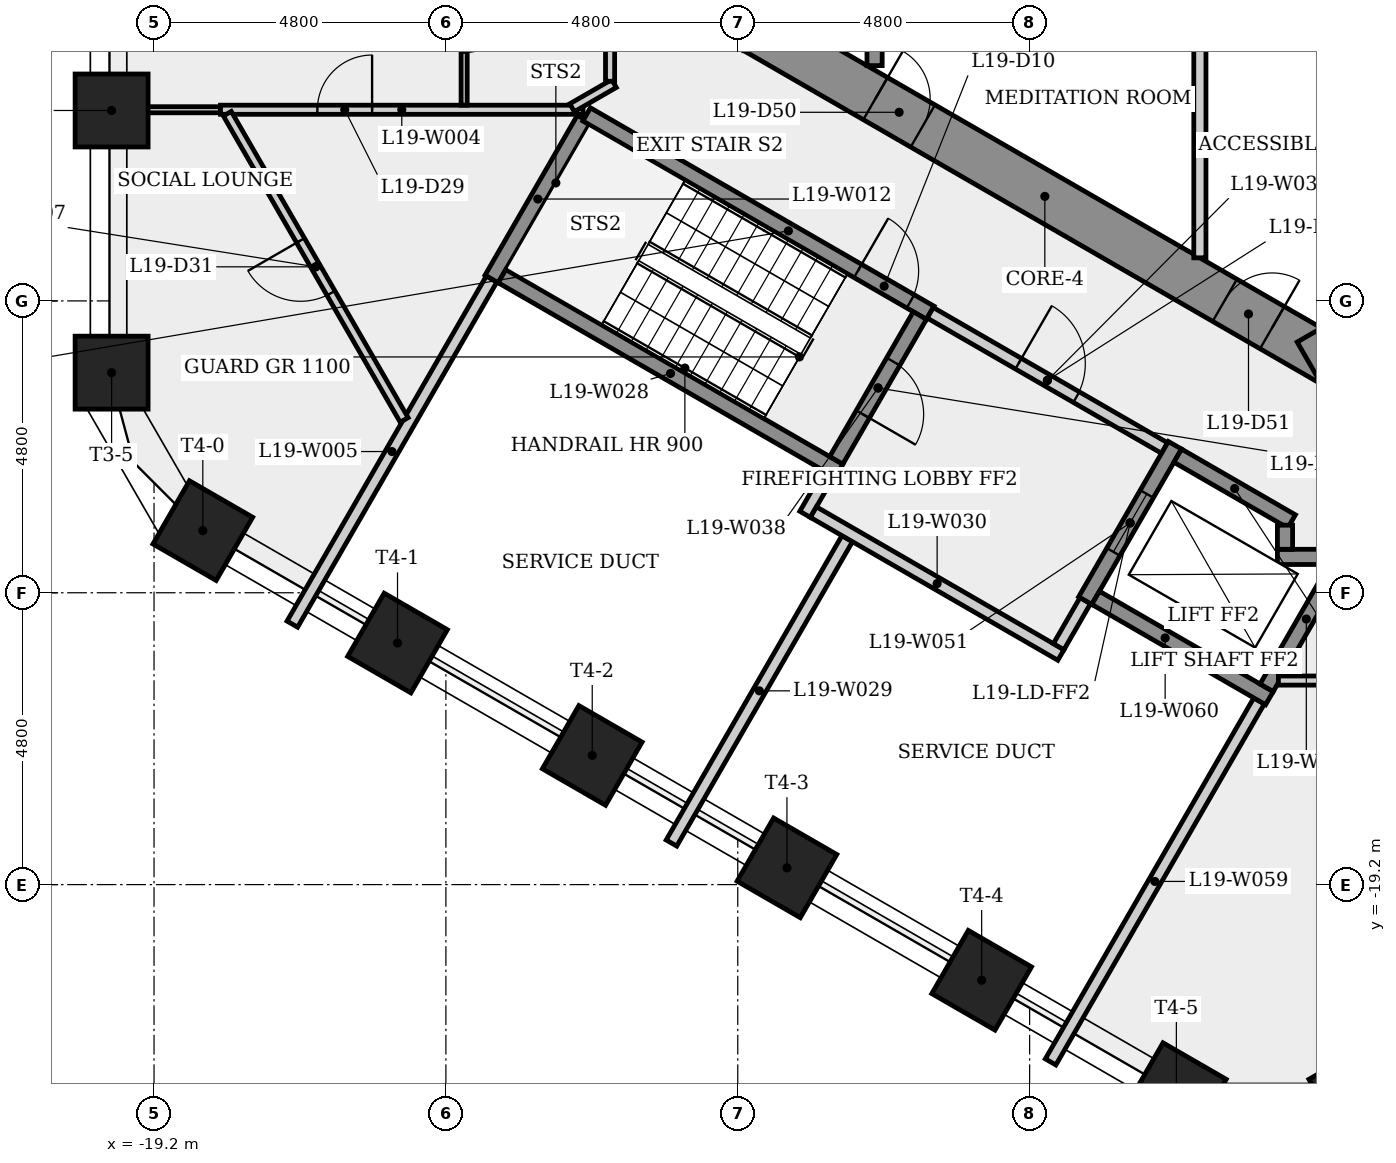
"""IFC4 building model, lengths in metres.
Left out: names, types, materials, properties, quantities, classifications, styles, units other than length and angle.
Written with IfcOpenShell. Run it as: python <this file> out.ifc"""

import sys

from ifc_helpers import new_model, si_unit, direction, frame, frame_2d, origin, origin_2d, place, context, subcontext, project, spatial, rectangle, extrude, element, fill, save


model = new_model("IFC4")
c1 = context("Model", 3, precision=1e-05, world=origin(), true_north=direction((0.0, 1.0)))
c2 = subcontext(c1, "Body", "Model", "MODEL_VIEW")
j1 = project(units=[si_unit("LENGTHUNIT", "METRE"), si_unit("PLANEANGLEUNIT", "RADIAN")], contexts=[c1])
p1 = place(None, origin())
s1 = spatial("IfcSite", under=j1, at=p1, CompositionType="ELEMENT")
p2 = place(p1, origin())
s2 = spatial("IfcBuilding", under=s1, at=p2, CompositionType="ELEMENT")
p3 = place(p2, frame((0.0, 0.0, 74.3)))
s3 = spatial("IfcBuildingStorey", under=s2, at=p3, CompositionType="ELEMENT", Elevation=74.3)
p4 = place(p3, frame((-9.3, -5.138, 0.0), z_axis=(0.0, 0.0, 1.0), x_axis=(0.866023993627, -0.500002442456, 0.0)))
e1 = element("IfcWall", 1, at=p4, inside=s3, PredefinedType="SHEAR", context=c2, shape_type="SweptSolid", body=[
    extrude(rectangle(XDim=10.97, YDim=0.8, at=frame_2d((5.485, 0.0))), origin(), (0.0, 0.0, 1.0), 4.0),
])
p5 = place(p4, frame((2.268, 0.0, 0.0)))
e2 = element("IfcOpeningElement", 2, at=p5, cuts=e1, PredefinedType="OPENING", context=c2, shape_type="SweptSolid", body=[
    extrude(rectangle(XDim=0.9, YDim=2.1, at=frame_2d((0.45, 1.05))), frame((0.0, 0.41, 0.0), z_axis=(0.0, -1.0, 0.0), x_axis=(1.0, 0.0, 0.0)), (0.0, 0.0, 1.0), 0.82),
])
p6 = place(p4, frame((8.903, 0.0, 0.0)))
e3 = element("IfcOpeningElement", 3, at=p6, cuts=e1, PredefinedType="OPENING", context=c2, shape_type="SweptSolid", body=[
    extrude(rectangle(XDim=0.9, YDim=2.1, at=frame_2d((0.45, 1.05))), frame((0.0, 0.41, 0.0), z_axis=(0.0, -1.0, 0.0), x_axis=(1.0, 0.0, 0.0)), (0.0, 0.0, 1.0), 0.82),
])
p7 = place(p3, frame((-0.2, -10.623, 0.0), z_axis=(0.0, 0.0, 1.0), x_axis=(0.866023993627, 0.500002442456, 0.0)))
e4 = element("IfcWall", 4, at=p7, inside=s3, PredefinedType="SHEAR", context=c2, shape_type="SweptSolid", body=[
    extrude(rectangle(XDim=10.97, YDim=0.8, at=frame_2d((5.485, 0.0))), origin(), (0.0, 0.0, 1.0), 4.0),
])
p8 = place(p7, frame((7.108, 0.0, 0.0)))
e5 = element("IfcOpeningElement", 5, at=p8, cuts=e4, PredefinedType="OPENING", context=c2, shape_type="SweptSolid", body=[
    extrude(rectangle(XDim=0.9, YDim=2.1, at=frame_2d((0.45, 1.05))), frame((0.0, 0.41, 0.0), z_axis=(0.0, -1.0, 0.0), x_axis=(1.0, 0.0, 0.0)), (0.0, 0.0, 1.0), 0.82),
])
for number, where, z_axis, x_axis in (
    (6, (-19.898, -6.468, 0.0), (0.0, 0.0, 1.0), (-1.0, 0.0, 0.0)),
    (7, (-19.898, -10.78, 0.0), (0.0, 0.0, 1.0), (-1.0, 0.0, 0.0)),
    (8, (-18.398, -13.378, 0.0), (0.0, 0.0, 1.0), (-0.5, -0.866, 0.0)),
    (9, (-15.196, -15.227, 0.0), (0.0, 0.0, 1.0), (-0.5, -0.866, 0.0)),
    (10, (-11.993, -17.076, 0.0), (0.0, 0.0, 1.0), (-0.5, -0.866, 0.0)),
    (11, (-8.791, -18.924, 0.0), (0.0, 0.0, 1.0), (-0.5, -0.866, 0.0)),
    (12, (-5.589, -20.773, 0.0), (0.0, 0.0, 1.0), (-0.5, -0.866, 0.0)),
    (13, (-2.387, -22.622, 0.0), (0.0, 0.0, 1.0), (-0.5, -0.866, 0.0)),
    (14, (0.613, -22.622, 0.0), (0.0, 0.0, 1.0), (0.5, -0.866, 0.0)),
):
    element("IfcColumn", number, at=place(p3, frame(where, z_axis=z_axis, x_axis=x_axis)), inside=s3, PredefinedType="COLUMN", context=c2, shape_type="SweptSolid", body=[
        extrude(rectangle(XDim=1.2, YDim=1.2, at=origin_2d()), origin(), (0.0, 0.0, 1.0), 4.0),
    ])
p9 = place(p3, frame((-18.107, -6.456, 0.0), z_axis=(0.0, 0.0, 1.0), x_axis=(-1.0, 0.0, 0.0)))
e15 = element("IfcWall", 15, at=p9, inside=s3, PredefinedType="PARTITIONING", context=c2, shape_type="SweptSolid", body=[
    extrude(rectangle(XDim=1.826, YDim=0.1, at=frame_2d((0.913, 0.0))), origin(), (0.0, 0.0, 1.0), 3.6),
])
p10 = place(p3, frame((-18.107, -6.456, 0.0), z_axis=(0.0, 0.0, 1.0), x_axis=(1.0, 0.0, 0.0)))
e16 = element("IfcWall", 16, at=p10, inside=s3, PredefinedType="PARTITIONING", context=c2, shape_type="SweptSolid", body=[
    extrude(rectangle(XDim=5.963, YDim=0.15, at=frame_2d((2.981, 0.0))), origin(), (0.0, 0.0, 1.0), 3.6),
])
p11 = place(p10, frame((1.593, 0.0, 0.0)))
e17 = element("IfcOpeningElement", 17, at=p11, cuts=e16, PredefinedType="OPENING", context=c2, shape_type="SweptSolid", body=[
    extrude(rectangle(XDim=0.9, YDim=2.1, at=frame_2d((0.45, 1.05))), frame((0.0, 0.085, 0.0), z_axis=(0.0, -1.0, 0.0), x_axis=(1.0, 0.0, 0.0)), (0.0, 0.0, 1.0), 0.17),
])
p12 = place(p3, frame((-16.926, -14.916, 0.0), z_axis=(0.0, 0.0, 1.0), x_axis=(0.499992165211, 0.866029927155, 0.0)))
e18 = element("IfcWall", 18, at=p12, inside=s3, PredefinedType="PLUMBINGWALL", context=c2, shape_type="SweptSolid", body=[
    extrude(rectangle(XDim=6.556, YDim=0.2, at=frame_2d((3.278, 0.0))), origin(), (0.0, 0.0, 1.0), 3.6),
])
p13 = place(p3, frame((-15.087, -11.558, 0.0), z_axis=(0.0, 0.0, 1.0), x_axis=(-0.499958648831, 0.866049276577, 0.0)))
e19 = element("IfcWall", 19, at=p13, inside=s3, PredefinedType="PARTITIONING", context=c2, shape_type="SweptSolid", body=[
    extrude(rectangle(XDim=5.816, YDim=0.15, at=frame_2d((2.908, 0.0))), origin(), (0.0, 0.0, 1.0), 3.6),
])
p14 = place(p13, frame((2.408, 0.0, 0.0)))
e20 = element("IfcOpeningElement", 20, at=p14, cuts=e19, PredefinedType="OPENING", context=c2, shape_type="SweptSolid", body=[
    extrude(rectangle(XDim=1.0, YDim=2.1, at=frame_2d((0.5, 1.05))), frame((0.0, 0.085, 0.0), z_axis=(0.0, -1.0, 0.0), x_axis=(1.0, 0.0, 0.0)), (0.0, 0.0, 1.0), 0.17),
])
p15 = place(p3, frame((-14.1, -3.802, 0.0), z_axis=(0.0, 0.0, 1.0), x_axis=(0.0, -1.0, 0.0)))
e21 = element("IfcWall", 21, at=p15, inside=s3, PredefinedType="PARTITIONING", context=c2, shape_type="SweptSolid", body=[
    extrude(rectangle(XDim=2.579, YDim=0.1, at=frame_2d((1.29, 0.0))), origin(), (0.0, 0.0, 1.0), 3.6),
])
p16 = place(p15, frame((0.914, 0.0, 0.0)))
e22 = element("IfcOpeningElement", 22, at=p16, cuts=e21, PredefinedType="OPENING", context=c2, shape_type="SweptSolid", body=[
    extrude(rectangle(XDim=0.8, YDim=2.1, at=frame_2d((0.4, 1.05))), frame((0.0, 0.06, 0.0), z_axis=(0.0, -1.0, 0.0), x_axis=(1.0, 0.0, 0.0)), (0.0, 0.0, 1.0), 0.12),
])
p17 = place(p3, frame((-13.648, -9.239, 0.0), z_axis=(0.0, 0.0, 1.0), x_axis=(0.50000556753, 0.866022189346, 0.0)))
e23 = element("IfcWall", 23, at=p17, inside=s3, PredefinedType="SHEAR", context=c2, shape_type="SweptSolid", body=[
    extrude(rectangle(XDim=3.036, YDim=0.25, at=frame_2d((1.518, 0.0))), origin(), (0.0, 0.0, 1.0), 3.6),
])
p18 = place(p3, frame((-12.325, -6.423, 0.0), z_axis=(0.0, 0.0, 1.0), x_axis=(0.86602732995, 0.499996663769, 0.0)))
e24 = element("IfcWall", 24, at=p18, inside=s3, PredefinedType="PARTITIONING", context=c2, shape_type="SweptSolid", body=[
    extrude(rectangle(XDim=0.796, YDim=0.15, at=frame_2d((0.398, 0.0))), origin(), (0.0, 0.0, 1.0), 3.6),
])
p19 = place(p3, frame((-12.085, -6.532, 0.0), z_axis=(0.0, 0.0, 1.0), x_axis=(0.86604373436, -0.499968249168, 0.0)))
e25 = element("IfcWall", 25, at=p19, inside=s3, PredefinedType="SHEAR", context=c2, shape_type="SweptSolid", body=[
    extrude(rectangle(XDim=1.118, YDim=0.25, at=frame_2d((0.559, 0.0))), origin(), (0.0, 0.0, 1.0), 3.6),
])
p20 = place(p3, frame((-11.7, 6.137, 0.0), z_axis=(0.0, 0.0, 1.0), x_axis=(0.0, -1.0, 0.0)))
e26 = element("IfcWall", 26, at=p20, inside=s3, PredefinedType="PARTITIONING", context=c2, shape_type="SweptSolid", body=[
    extrude(rectangle(XDim=12.125, YDim=0.15, at=frame_2d((6.062, 0.0))), origin(), (0.0, 0.0, 1.0), 3.6),
])
p21 = place(p20, frame((5.637, 0.0, 0.0)))
e27 = element("IfcOpeningElement", 27, at=p21, cuts=e26, PredefinedType="OPENING", context=c2, shape_type="SweptSolid", body=[
    extrude(rectangle(XDim=1.0, YDim=2.1, at=frame_2d((0.5, 1.05))), frame((0.0, 0.085, 0.0), z_axis=(0.0, -1.0, 0.0), x_axis=(1.0, 0.0, 0.0)), (0.0, 0.0, 1.0), 0.17),
])
p22 = place(p3, frame((-11.1, -7.101, 0.0), z_axis=(0.0, 0.0, 1.0), x_axis=(0.866028615007, -0.499994437958, 0.0)))
e28 = element("IfcWall", 28, at=p22, inside=s3, PredefinedType="SHEAR", context=c2, shape_type="SweptSolid", body=[
    extrude(rectangle(XDim=5.387, YDim=0.25, at=frame_2d((2.694, 0.0))), origin(), (0.0, 0.0, 1.0), 3.6),
])
p23 = place(p22, frame((4.012, 0.0, 0.0)))
e29 = element("IfcOpeningElement", 29, at=p23, cuts=e28, PredefinedType="OPENING", context=c2, shape_type="SweptSolid", body=[
    extrude(rectangle(XDim=1.0, YDim=2.1, at=frame_2d((0.5, 1.05))), frame((0.0, 0.135, 0.0), z_axis=(0.0, -1.0, 0.0), x_axis=(1.0, 0.0, 0.0)), (0.0, 0.0, 1.0), 0.27),
])
p24 = place(p3, frame((-8.493, -13.11, 0.0), z_axis=(0.0, 0.0, 1.0), x_axis=(0.500067724834, 0.865986299303, 0.0)))
e30 = element("IfcWall", 30, at=p24, inside=s3, PredefinedType="PLUMBINGWALL", context=c2, shape_type="SweptSolid", body=[
    extrude(rectangle(XDim=0.775, YDim=0.2, at=frame_2d((0.388, 0.0))), origin(), (0.0, 0.0, 1.0), 3.6),
])
p25 = place(p3, frame((-7.935, -12.393, 0.0), z_axis=(0.0, 0.0, 1.0), x_axis=(-0.866025499775, 0.499999833739, 0.0)))
e31 = element("IfcWall", 31, at=p25, inside=s3, PredefinedType="SHEAR", context=c2, shape_type="SweptSolid", body=[
    extrude(rectangle(XDim=6.4, YDim=0.25, at=frame_2d((3.2, 0.0))), origin(), (0.0, 0.0, 1.0), 3.6),
])
p26 = place(p3, frame((-7.8, -13.51, 0.0), z_axis=(0.0, 0.0, 1.0), x_axis=(-0.499982030767, -0.866035778077, 0.0)))
e32 = element("IfcWall", 32, at=p26, inside=s3, PredefinedType="PLUMBINGWALL", context=c2, shape_type="SweptSolid", body=[
    extrude(rectangle(XDim=5.781, YDim=0.2, at=frame_2d((2.89, 0.0))), origin(), (0.0, 0.0, 1.0), 3.6),
])
p27 = place(p3, frame((-8.356, -13.073, 0.0), z_axis=(0.0, 0.0, 1.0), x_axis=(0.866038532462, -0.499977259774, 0.0)))
e33 = element("IfcWall", 33, at=p27, inside=s3, PredefinedType="PLUMBINGWALL", context=c2, shape_type="SweptSolid", body=[
    extrude(rectangle(XDim=4.7, YDim=0.2, at=frame_2d((2.35, 0.0))), origin(), (0.0, 0.0, 1.0), 3.6),
])
p28 = place(p3, frame((-7.35, -5.73, 0.0), z_axis=(0.0, 0.0, 1.0), x_axis=(0.0, 1.0, 0.0)))
e34 = element("IfcWall", 34, at=p28, inside=s3, PredefinedType="SHEAR", context=c2, shape_type="SweptSolid", body=[
    extrude(rectangle(XDim=4.055, YDim=0.25, at=frame_2d((2.028, 0.0))), origin(), (0.0, 0.0, 1.0), 3.6),
])
p29 = place(p3, frame((-6.605, -9.841, 0.0), z_axis=(0.0, 0.0, 1.0), x_axis=(-0.499996545922, -0.866027397988, 0.0)))
e35 = element("IfcWall", 35, at=p29, inside=s3, PredefinedType="SHEAR", context=c2, shape_type="SweptSolid", body=[
    extrude(rectangle(XDim=2.75, YDim=0.25, at=frame_2d((1.375, 0.0))), origin(), (0.0, 0.0, 1.0), 3.6),
])
p30 = place(p29, frame((0.875, 0.0, 0.0)))
e36 = element("IfcOpeningElement", 36, at=p30, cuts=e35, PredefinedType="OPENING", context=c2, shape_type="SweptSolid", body=[
    extrude(rectangle(XDim=1.0, YDim=2.1, at=frame_2d((0.5, 1.05))), frame((0.0, 0.135, 0.0), z_axis=(0.0, -1.0, 0.0), x_axis=(1.0, 0.0, 0.0)), (0.0, 0.0, 1.0), 0.27),
])
p31 = place(p3, frame((-6.435, -9.795, 0.0), z_axis=(0.0, 0.0, 1.0), x_axis=(0.866012907634, -0.500021643343, 0.0)))
e37 = element("IfcWall", 37, at=p31, inside=s3, PredefinedType="PARTITIONING", context=c2, shape_type="SweptSolid", body=[
    extrude(rectangle(XDim=4.45, YDim=0.2, at=frame_2d((2.225, 0.0))), origin(), (0.0, 0.0, 1.0), 3.6),
])
p32 = place(p31, frame((1.675, 0.0, 0.0)))
e38 = element("IfcOpeningElement", 38, at=p32, cuts=e37, PredefinedType="OPENING", context=c2, shape_type="SweptSolid", body=[
    extrude(rectangle(XDim=1.1, YDim=2.1, at=frame_2d((0.55, 1.05))), frame((0.0, 0.11, 0.0), z_axis=(0.0, -1.0, 0.0), x_axis=(1.0, 0.0, 0.0)), (0.0, 0.0, 1.0), 0.22),
])
p33 = place(p3, frame((-3.885, -14.529, 0.0), z_axis=(0.0, 0.0, 1.0), x_axis=(-0.499859285417, -0.866106630146, 0.0)))
e39 = element("IfcWall", 39, at=p33, inside=s3, PredefinedType="PLUMBINGWALL", context=c2, shape_type="SweptSolid", body=[
    extrude(rectangle(XDim=0.875, YDim=0.2, at=frame_2d((0.438, 0.0))), origin(), (0.0, 0.0, 1.0), 3.6),
])
p34 = place(p3, frame((-2.41, -11.974, 0.0), z_axis=(0.0, 0.0, 1.0), x_axis=(-0.500001826776, -0.866024349092, 0.0)))
e40 = element("IfcWall", 40, at=p34, inside=s3, PredefinedType="SHEAR", context=c2, shape_type="SweptSolid", body=[
    extrude(rectangle(XDim=2.95, YDim=0.25, at=frame_2d((1.475, 0.0))), origin(), (0.0, 0.0, 1.0), 3.6),
])
p35 = place(p34, frame((0.925, 0.0, 0.0)))
e41 = element("IfcOpeningElement", 41, at=p35, cuts=e40, PredefinedType="OPENING", context=c2, shape_type="SweptSolid", body=[
    extrude(rectangle(XDim=1.1, YDim=2.1, at=frame_2d((0.55, 1.05))), frame((0.0, 0.135, 0.0), z_axis=(0.0, -1.0, 0.0), x_axis=(1.0, 0.0, 0.0)), (0.0, 0.0, 1.0), 0.27),
])
p36 = place(p3, frame((-2.364, -12.145, 0.0), z_axis=(0.0, 0.0, 1.0), x_axis=(0.86603892542, -0.499976579108, 0.0)))
e42 = element("IfcWall", 42, at=p36, inside=s3, PredefinedType="SHEAR", context=c2, shape_type="SweptSolid", body=[
    extrude(rectangle(XDim=2.162, YDim=0.25, at=frame_2d((1.081, 0.0))), origin(), (0.0, 0.0, 1.0), 3.6),
])
p37 = place(p3, frame((-2.0, -5.275, 0.0), z_axis=(0.0, 0.0, 1.0), x_axis=(0.0, -1.0, 0.0)))
e43 = element("IfcWall", 43, at=p37, inside=s3, PredefinedType="PARTITIONING", context=c2, shape_type="SweptSolid", body=[
    extrude(rectangle(XDim=3.616, YDim=0.2, at=frame_2d((1.808, 0.0))), origin(), (0.0, 0.0, 1.0), 3.6),
])
p38 = place(p3, frame((-1.027, -16.179, 0.0), z_axis=(0.0, 0.0, 1.0), x_axis=(-0.499984476993, -0.866034365811, 0.0)))
e44 = element("IfcWall", 44, at=p38, inside=s3, PredefinedType="PLUMBINGWALL", context=c2, shape_type="SweptSolid", body=[
    extrude(rectangle(XDim=6.856, YDim=0.2, at=frame_2d((3.428, 0.0))), origin(), (0.0, 0.0, 1.0), 3.6),
])
p39 = place(p3, frame((-0.856, -16.133, 0.0), z_axis=(0.0, 0.0, 1.0), x_axis=(-0.866021716278, 0.500006386895, 0.0)))
e45 = element("IfcWall", 45, at=p39, inside=s3, PredefinedType="SHEAR", context=c2, shape_type="SweptSolid", body=[
    extrude(rectangle(XDim=3.3, YDim=0.25, at=frame_2d((1.65, 0.0))), origin(), (0.0, 0.0, 1.0), 3.6),
])
p40 = place(p3, frame((-0.902, -15.962, 0.0), z_axis=(0.0, 0.0, 1.0), x_axis=(0.499981517636, 0.866036074319, 0.0)))
e46 = element("IfcWall", 46, at=p40, inside=s3, PredefinedType="SHEAR", context=c2, shape_type="SweptSolid", body=[
    extrude(rectangle(XDim=2.61, YDim=0.25, at=frame_2d((1.305, 0.0))), origin(), (0.0, 0.0, 1.0), 3.6),
])
p41 = place(p3, frame((-0.725, -13.81, 0.0), z_axis=(0.0, 0.0, 1.0), x_axis=(1.0, 0.0, 0.0)))
e47 = element("IfcWall", 47, at=p41, inside=s3, PredefinedType="SHEAR", context=c2, shape_type="SweptSolid", body=[
    extrude(rectangle(XDim=0.941, YDim=0.25, at=frame_2d((0.47, 0.0))), origin(), (0.0, 0.0, 1.0), 4.0),
])
p42 = place(p3, frame((-0.6, -13.289, 0.0), z_axis=(0.0, 0.0, 1.0), x_axis=(0.0, -1.0, 0.0)))
e48 = element("IfcWall", 48, at=p42, inside=s3, PredefinedType="SHEAR", context=c2, shape_type="SweptSolid", body=[
    extrude(rectangle(XDim=0.396, YDim=0.25, at=frame_2d((0.198, 0.0))), origin(), (0.0, 0.0, 1.0), 4.0),
])
p43 = place(p3, frame((3.505, -15.844, 0.0), z_axis=(0.0, 0.0, 1.0), x_axis=(-1.0, 0.0, 0.0)))
e49 = element("IfcWall", 49, at=p43, inside=s3, PredefinedType="PARTITIONING", context=c2, shape_type="SweptSolid", body=[
    extrude(rectangle(XDim=4.214, YDim=0.15, at=frame_2d((2.107, 0.0))), origin(), (0.0, 0.0, 1.0), 3.6),
])
p44 = place(p3, frame((15.974, -15.302, 0.0), z_axis=(0.0, 0.0, 1.0), x_axis=(-0.866022405705, -0.500005192789, 0.0)))
e50 = element("IfcWall", 50, at=p44, inside=s3, PredefinedType="PARTITIONING", context=c2, shape_type="SweptSolid", body=[
    extrude(rectangle(XDim=28.179, YDim=0.1, at=frame_2d((14.089, 0.0))), origin(), (0.0, 0.0, 1.0), 3.6),
])
for number, where, z_axis, x_axis in (
    (51, (17.784, -18.438, 0.0), (0.0, 0.0, 1.0), (-0.866, -0.5, 0.0)),
    (52, (19.595, -21.574, 0.0), (0.0, 0.0, 1.0), (-0.866, -0.5, 0.0)),
):
    element("IfcWall", number, at=place(p3, frame(where, z_axis=z_axis, x_axis=x_axis)), inside=s3, PredefinedType="PARTITIONING", context=c2, shape_type="SweptSolid", body=[
        extrude(rectangle(XDim=28.178, YDim=0.1, at=frame_2d((14.089, 0.0))), origin(), (0.0, 0.0, 1.0), 3.275),
    ])
p45 = place(p23, origin())
e53 = element("IfcDoor", 53, at=p45, inside=s3, OperationType="SINGLE_SWING_LEFT", PredefinedType="DOOR", context=c2, shape_type="SweptSolid", body=[
    extrude(rectangle(XDim=1.0, YDim=2.1, at=frame_2d((0.5, 1.05))), frame((0.0, 0.025, 0.0), z_axis=(0.0, -1.0, 0.0), x_axis=(1.0, 0.0, 0.0)), (0.0, 0.0, 1.0), 0.05),
])
fill(e29, e53)
p46 = place(p30, origin())
e54 = element("IfcDoor", 54, at=p46, inside=s3, OperationType="SINGLE_SWING_RIGHT", PredefinedType="DOOR", context=c2, shape_type="SweptSolid", body=[
    extrude(rectangle(XDim=1.0, YDim=2.1, at=frame_2d((0.5, 1.05))), frame((0.0, 0.025, 0.0), z_axis=(0.0, -1.0, 0.0), x_axis=(1.0, 0.0, 0.0)), (0.0, 0.0, 1.0), 0.05),
])
fill(e36, e54)
p47 = place(p32, origin())
e55 = element("IfcDoor", 55, at=p47, inside=s3, OperationType="SINGLE_SWING_LEFT", PredefinedType="DOOR", context=c2, shape_type="SweptSolid", body=[
    extrude(rectangle(XDim=1.1, YDim=2.1, at=frame_2d((0.55, 1.05))), frame((0.0, 0.025, 0.0), z_axis=(0.0, -1.0, 0.0), x_axis=(1.0, 0.0, 0.0)), (0.0, 0.0, 1.0), 0.05),
])
fill(e38, e55)
p48 = place(p35, origin())
e56 = element("IfcDoor", 56, at=p48, inside=s3, OperationType="SLIDING_TO_LEFT", PredefinedType="DOOR", context=c2, shape_type="SweptSolid", body=[
    extrude(rectangle(XDim=1.1, YDim=2.1, at=frame_2d((0.55, 1.05))), frame((0.0, 0.025, 0.0), z_axis=(0.0, -1.0, 0.0), x_axis=(1.0, 0.0, 0.0)), (0.0, 0.0, 1.0), 0.05),
])
fill(e41, e56)
p49 = place(p11, origin())
e57 = element("IfcDoor", 57, at=p49, inside=s3, OperationType="SINGLE_SWING_RIGHT", PredefinedType="DOOR", context=c2, shape_type="SweptSolid", body=[
    extrude(rectangle(XDim=0.9, YDim=2.1, at=frame_2d((0.45, 1.05))), frame((0.0, 0.025, 0.0), z_axis=(0.0, -1.0, 0.0), x_axis=(1.0, 0.0, 0.0)), (0.0, 0.0, 1.0), 0.05),
])
fill(e17, e57)
p50 = place(p16, origin())
e58 = element("IfcDoor", 58, at=p50, inside=s3, OperationType="SINGLE_SWING_LEFT", PredefinedType="DOOR", context=c2, shape_type="SweptSolid", body=[
    extrude(rectangle(XDim=0.8, YDim=2.1, at=frame_2d((0.4, 1.05))), frame((0.0, 0.025, 0.0), z_axis=(0.0, -1.0, 0.0), x_axis=(1.0, 0.0, 0.0)), (0.0, 0.0, 1.0), 0.05),
])
fill(e22, e58)
p51 = place(p14, origin())
e59 = element("IfcDoor", 59, at=p51, inside=s3, OperationType="SINGLE_SWING_RIGHT", PredefinedType="DOOR", context=c2, shape_type="SweptSolid", body=[
    extrude(rectangle(XDim=1.0, YDim=2.1, at=frame_2d((0.5, 1.05))), frame((0.0, 0.025, 0.0), z_axis=(0.0, -1.0, 0.0), x_axis=(1.0, 0.0, 0.0)), (0.0, 0.0, 1.0), 0.05),
])
fill(e20, e59)
p52 = place(p5, origin())
e60 = element("IfcDoor", 60, at=p52, inside=s3, OperationType="SINGLE_SWING_LEFT", PredefinedType="DOOR", context=c2, shape_type="SweptSolid", body=[
    extrude(rectangle(XDim=0.9, YDim=2.1, at=frame_2d((0.45, 1.05))), frame((0.0, 0.025, 0.0), z_axis=(0.0, -1.0, 0.0), x_axis=(1.0, 0.0, 0.0)), (0.0, 0.0, 1.0), 0.05),
])
fill(e2, e60)
p53 = place(p6, origin())
e61 = element("IfcDoor", 61, at=p53, inside=s3, OperationType="SINGLE_SWING_RIGHT", PredefinedType="DOOR", context=c2, shape_type="SweptSolid", body=[
    extrude(rectangle(XDim=0.9, YDim=2.1, at=frame_2d((0.45, 1.05))), frame((0.0, 0.025, 0.0), z_axis=(0.0, -1.0, 0.0), x_axis=(1.0, 0.0, 0.0)), (0.0, 0.0, 1.0), 0.05),
])
fill(e3, e61)
save(model, sys.argv[1])
